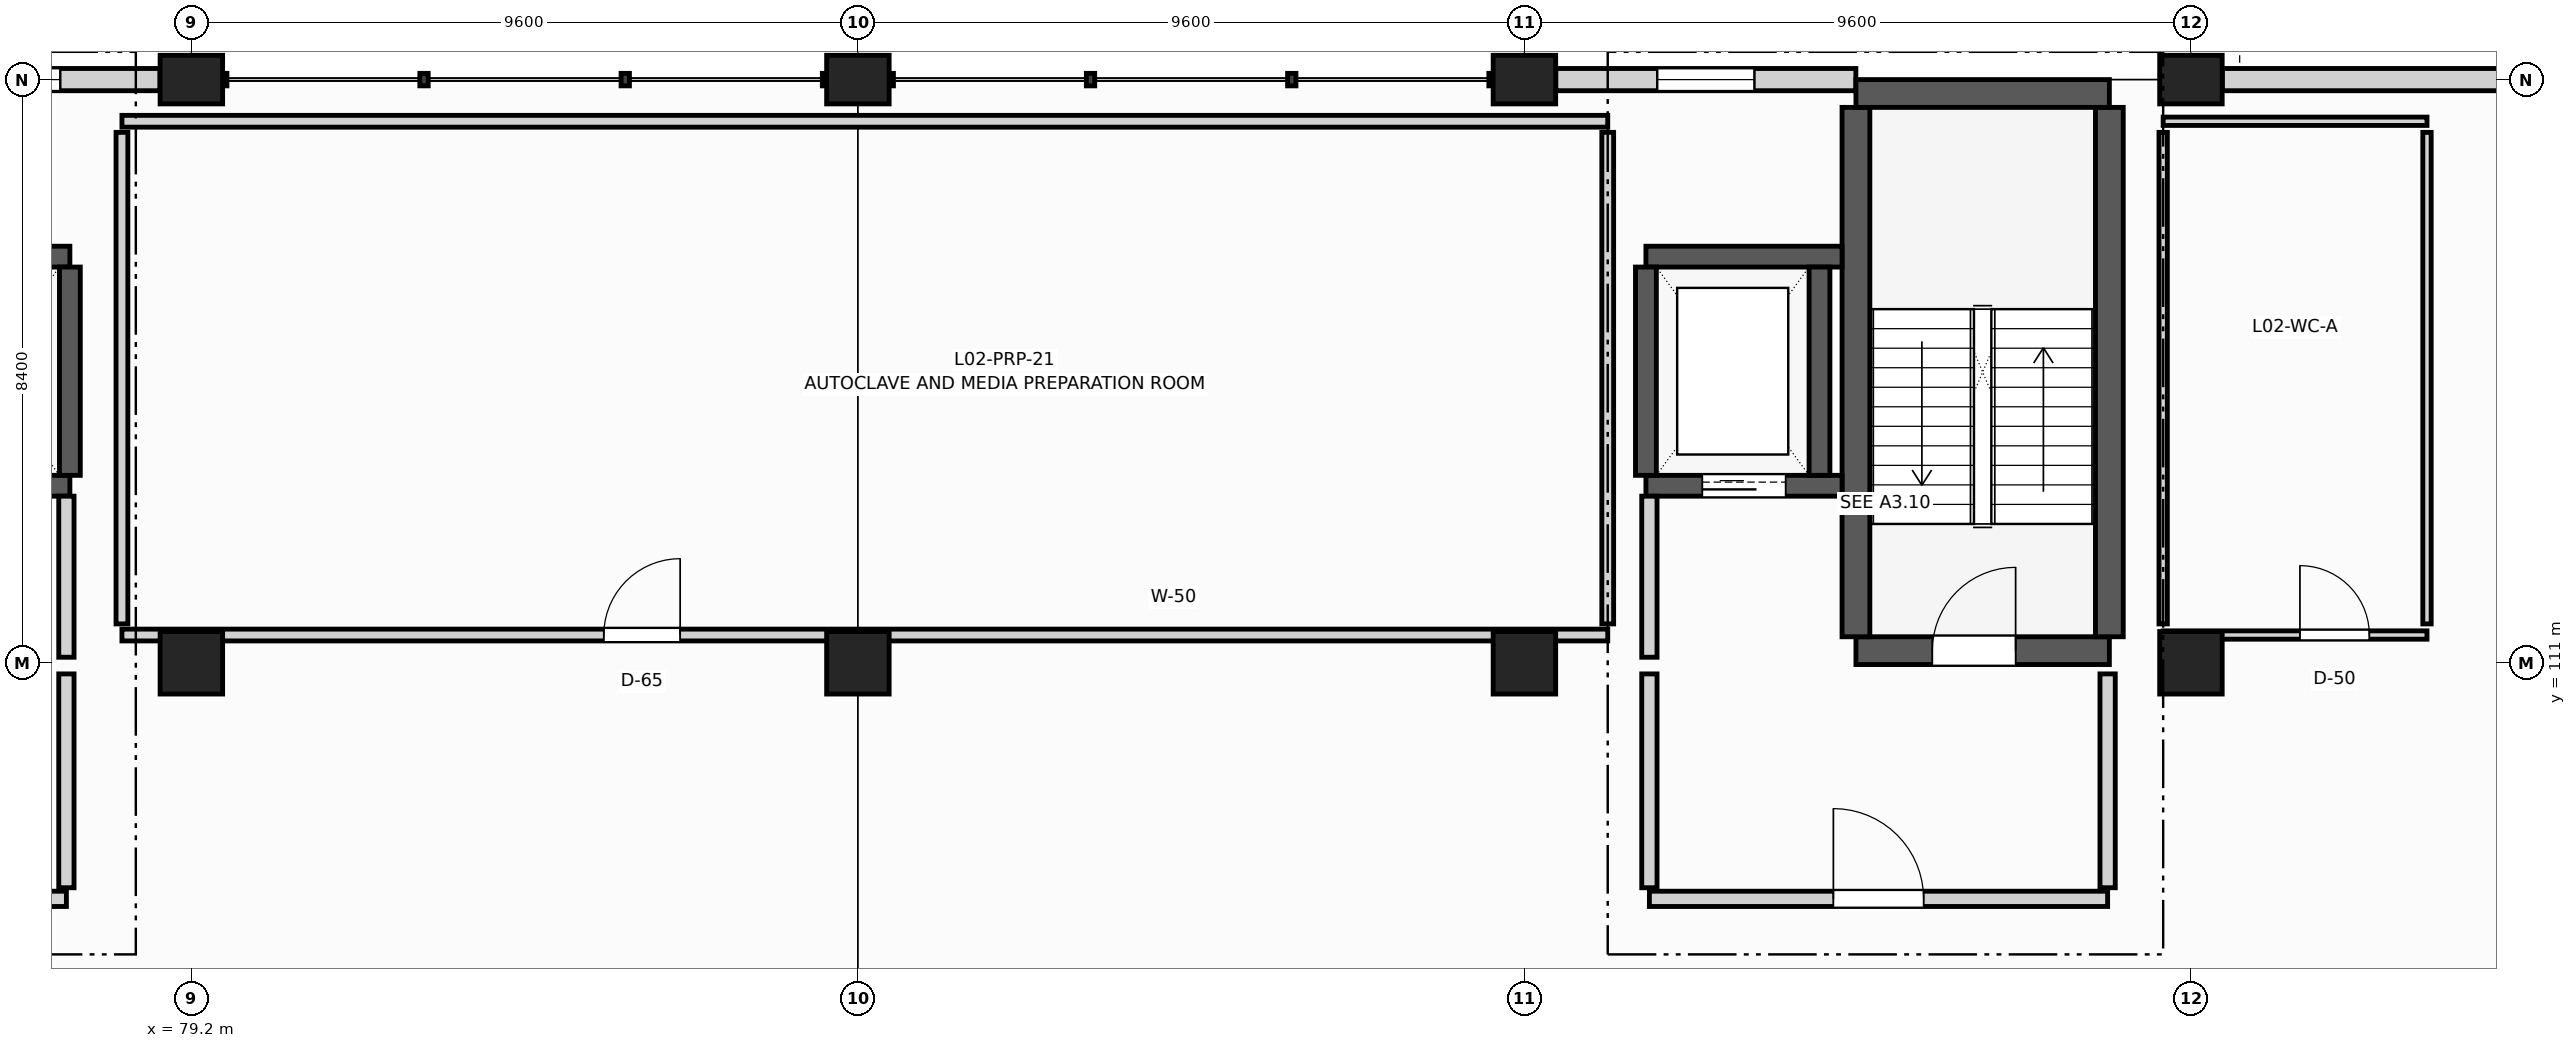
"""IFC4 building model, lengths in metres.
Left out: names, types, materials, properties, quantities, classifications, styles, units other than length and angle.
Written with IfcOpenShell. Run it as: python <this file> out.ifc"""

import sys

from ifc_helpers import new_model, si_unit, direction, frame, frame_2d, origin, origin_2d, place, context, subcontext, project, spatial, rectangle, extrude, element, fill, save


model = new_model("IFC4")
c1 = context("Model", 3, precision=1e-05, world=origin(), true_north=direction((0.0, 1.0)))
c2 = subcontext(c1, "Body", "Model", "MODEL_VIEW")
j1 = project(units=[si_unit("LENGTHUNIT", "METRE"), si_unit("PLANEANGLEUNIT", "RADIAN")], contexts=[c1])
p1 = place(None, origin())
s1 = spatial("IfcSite", under=j1, at=p1, CompositionType="ELEMENT")
p2 = place(p1, origin())
s2 = spatial("IfcBuilding", under=s1, at=p2, CompositionType="ELEMENT")
p3 = place(p2, frame((0.0, 0.0, 9.9)))
s3 = spatial("IfcBuildingStorey", under=s2, at=p3, CompositionType="ELEMENT", Elevation=9.9)
p4 = place(p3, frame((79.2, 111.0, 0.0), z_axis=(0.0, 0.0, 1.0), x_axis=(1.0, 0.0, 0.0)))
e1 = element("IfcColumn", 1, at=p4, inside=s3, PredefinedType="COLUMN", context=c2, shape_type="SweptSolid", body=[
    extrude(rectangle(XDim=0.9, YDim=0.9, at=origin_2d()), origin(), (0.0, 0.0, 1.0), 3.9),
])
p5 = place(p3, frame((79.2, 119.4, 0.0), z_axis=(0.0, 0.0, 1.0), x_axis=(1.0, 0.0, 0.0)))
e2 = element("IfcColumn", 2, at=p5, inside=s3, PredefinedType="COLUMN", context=c2, shape_type="SweptSolid", body=[
    extrude(rectangle(XDim=0.9, YDim=0.7, at=origin_2d()), origin(), (0.0, 0.0, 1.0), 3.9),
])
p6 = place(p3, frame((88.8, 111.0, 0.0), z_axis=(0.0, 0.0, 1.0), x_axis=(1.0, 0.0, 0.0)))
e3 = element("IfcColumn", 3, at=p6, inside=s3, PredefinedType="COLUMN", context=c2, shape_type="SweptSolid", body=[
    extrude(rectangle(XDim=0.9, YDim=0.9, at=origin_2d()), origin(), (0.0, 0.0, 1.0), 3.9),
])
p7 = place(p3, frame((88.8, 119.4, 0.0), z_axis=(0.0, 0.0, 1.0), x_axis=(1.0, 0.0, 0.0)))
e4 = element("IfcColumn", 4, at=p7, inside=s3, PredefinedType="COLUMN", context=c2, shape_type="SweptSolid", body=[
    extrude(rectangle(XDim=0.9, YDim=0.7, at=origin_2d()), origin(), (0.0, 0.0, 1.0), 3.9),
])
p8 = place(p3, frame((98.4, 111.0, 0.0), z_axis=(0.0, 0.0, 1.0), x_axis=(1.0, 0.0, 0.0)))
e5 = element("IfcColumn", 5, at=p8, inside=s3, PredefinedType="COLUMN", context=c2, shape_type="SweptSolid", body=[
    extrude(rectangle(XDim=0.9, YDim=0.9, at=origin_2d()), origin(), (0.0, 0.0, 1.0), 3.9),
])
p9 = place(p3, frame((98.4, 119.4, 0.0), z_axis=(0.0, 0.0, 1.0), x_axis=(1.0, 0.0, 0.0)))
e6 = element("IfcColumn", 6, at=p9, inside=s3, PredefinedType="COLUMN", context=c2, shape_type="SweptSolid", body=[
    extrude(rectangle(XDim=0.9, YDim=0.7, at=origin_2d()), origin(), (0.0, 0.0, 1.0), 3.9),
])
p10 = place(p3, frame((108.0, 111.0, 0.0), z_axis=(0.0, 0.0, 1.0), x_axis=(1.0, 0.0, 0.0)))
e7 = element("IfcColumn", 7, at=p10, inside=s3, PredefinedType="COLUMN", context=c2, shape_type="SweptSolid", body=[
    extrude(rectangle(XDim=0.9, YDim=0.9, at=origin_2d()), origin(), (0.0, 0.0, 1.0), 3.9),
])
p11 = place(p3, frame((108.0, 119.4, 0.0), z_axis=(0.0, 0.0, 1.0), x_axis=(1.0, 0.0, 0.0)))
e8 = element("IfcColumn", 8, at=p11, inside=s3, PredefinedType="COLUMN", context=c2, shape_type="SweptSolid", body=[
    extrude(rectangle(XDim=0.9, YDim=0.7, at=origin_2d()), origin(), (0.0, 0.0, 1.0), 3.9),
])
p12 = place(p3, frame((74.476, 119.4, 0.0), z_axis=(0.0, 0.0, 1.0), x_axis=(1.0, 0.0, 0.0)))
e9 = element("IfcWall", 9, at=p12, inside=s3, PredefinedType="SOLIDWALL", context=c2, shape_type="SweptSolid", body=[
    extrude(rectangle(XDim=4.272, YDim=0.32, at=frame_2d((2.136, 0.0))), origin(), (0.0, 0.0, 1.0), 3.08),
])
p13 = place(p12, frame((1.436, 0.0, 0.9)))
e10 = element("IfcOpeningElement", 10, at=p13, cuts=e9, PredefinedType="OPENING", context=c2, shape_type="SweptSolid", body=[
    extrude(rectangle(XDim=1.4, YDim=1.65, at=frame_2d((0.7, 0.825))), frame((0.0, 0.17, 0.0), z_axis=(0.0, -1.0, 0.0), x_axis=(1.0, 0.0, 0.0)), (0.0, 0.0, 1.0), 0.34),
])
p14 = place(p3, frame((98.852, 119.4, 0.0), z_axis=(0.0, 0.0, 1.0), x_axis=(1.0, 0.0, 0.0)))
e11 = element("IfcWall", 11, at=p14, inside=s3, PredefinedType="SOLIDWALL", context=c2, shape_type="SweptSolid", body=[
    extrude(rectangle(XDim=4.322, YDim=0.32, at=frame_2d((2.161, 0.0))), origin(), (0.0, 0.0, 1.0), 3.08),
])
p15 = place(p14, frame((1.461, 0.0, 0.9)))
e12 = element("IfcOpeningElement", 12, at=p15, cuts=e11, PredefinedType="OPENING", context=c2, shape_type="SweptSolid", body=[
    extrude(rectangle(XDim=1.4, YDim=1.65, at=frame_2d((0.7, 0.825))), frame((0.0, 0.17, 0.0), z_axis=(0.0, -1.0, 0.0), x_axis=(1.0, 0.0, 0.0)), (0.0, 0.0, 1.0), 0.34),
])
p16 = place(p3, frame((108.452, 119.4, 0.0), z_axis=(0.0, 0.0, 1.0), x_axis=(1.0, 0.0, 0.0)))
e13 = element("IfcWall", 13, at=p16, inside=s3, PredefinedType="SOLIDWALL", context=c2, shape_type="SweptSolid", body=[
    extrude(rectangle(XDim=8.696, YDim=0.32, at=frame_2d((4.348, 0.0))), origin(), (0.0, 0.0, 1.0), 3.08),
])
p17 = place(p16, frame((5.298, 0.0, 0.85)))
e14 = element("IfcOpeningElement", 14, at=p17, cuts=e13, PredefinedType="OPENING", context=c2, shape_type="SweptSolid", body=[
    extrude(rectangle(XDim=2.1, YDim=1.95, at=frame_2d((1.05, 0.975))), frame((0.0, 0.17, 0.0), z_axis=(0.0, -1.0, 0.0), x_axis=(1.0, 0.0, 0.0)), (0.0, 0.0, 1.0), 0.34),
])
p18 = place(p3, frame((103.175, 111.175, 0.0), z_axis=(0.0, 0.0, 1.0), x_axis=(1.0, 0.0, 0.0)))
e15 = element("IfcWall", 15, at=p18, inside=s3, PredefinedType="SHEAR", context=c2, shape_type="SweptSolid", body=[
    extrude(rectangle(XDim=3.65, YDim=0.4, at=frame_2d((1.825, 0.0))), origin(), (0.0, 0.0, 1.0), 3.9),
])
p19 = place(p18, frame((1.1, 0.0, 0.0)))
e16 = element("IfcOpeningElement", 16, at=p19, cuts=e15, PredefinedType="OPENING", context=c2, shape_type="SweptSolid", body=[
    extrude(rectangle(XDim=1.2, YDim=2.2, at=frame_2d((0.6, 1.1))), frame((0.0, 0.21, 0.0), z_axis=(0.0, -1.0, 0.0), x_axis=(1.0, 0.0, 0.0)), (0.0, 0.0, 1.0), 0.42),
])
for number, where, z_axis, x_axis in (
    (17, (103.175, 111.375, 0.0), (0.0, 0.0, 1.0), (0.0, 1.0, 0.0)),
    (18, (106.825, 111.375, 0.0), (0.0, 0.0, 1.0), (0.0, 1.0, 0.0)),
):
    element("IfcWall", number, at=place(p3, frame(where, z_axis=z_axis, x_axis=x_axis)), inside=s3, PredefinedType="SHEAR", context=c2, shape_type="SweptSolid", body=[
        extrude(rectangle(XDim=7.625, YDim=0.4, at=frame_2d((3.812, 0.0))), origin(), (0.0, 0.0, 1.0), 3.9),
    ])
p20 = place(p3, frame((103.175, 119.2, 0.0), z_axis=(0.0, 0.0, 1.0), x_axis=(1.0, 0.0, 0.0)))
e19 = element("IfcWall", 19, at=p20, inside=s3, PredefinedType="SHEAR", context=c2, shape_type="SweptSolid", body=[
    extrude(rectangle(XDim=3.65, YDim=0.4, at=frame_2d((1.825, 0.0))), origin(), (0.0, 0.0, 1.0), 3.9),
])
p21 = place(p3, frame((74.7, 113.55, 0.0), z_axis=(0.0, 0.0, 1.0), x_axis=(1.0, 0.0, 0.0)))
e20 = element("IfcWall", 20, at=p21, inside=s3, PredefinedType="SHEAR", context=c2, shape_type="SweptSolid", body=[
    extrude(rectangle(XDim=2.75, YDim=0.3, at=frame_2d((1.375, 0.0))), origin(), (0.0, 0.0, 1.0), 3.9),
])
p22 = place(p21, frame((0.775, 0.0, 0.0)))
e21 = element("IfcOpeningElement", 21, at=p22, cuts=e20, PredefinedType="OPENING", context=c2, shape_type="SweptSolid", body=[
    extrude(rectangle(XDim=1.2, YDim=2.2, at=frame_2d((0.6, 1.1))), frame((0.0, 0.16, 0.0), z_axis=(0.0, -1.0, 0.0), x_axis=(1.0, 0.0, 0.0)), (0.0, 0.0, 1.0), 0.32),
])
p23 = place(p3, frame((74.7, 116.85, 0.0), z_axis=(0.0, 0.0, 1.0), x_axis=(1.0, 0.0, 0.0)))
e22 = element("IfcWall", 22, at=p23, inside=s3, PredefinedType="SHEAR", context=c2, shape_type="SweptSolid", body=[
    extrude(rectangle(XDim=2.75, YDim=0.3, at=frame_2d((1.375, 0.0))), origin(), (0.0, 0.0, 1.0), 3.9),
])
p24 = place(p3, frame((77.45, 113.7, 0.0), z_axis=(0.0, 0.0, 1.0), x_axis=(0.0, 1.0, 0.0)))
e23 = element("IfcWall", 23, at=p24, inside=s3, PredefinedType="SHEAR", context=c2, shape_type="SweptSolid", body=[
    extrude(rectangle(XDim=3.0, YDim=0.3, at=frame_2d((1.5, 0.0))), origin(), (0.0, 0.0, 1.0), 3.9),
])
p25 = place(p3, frame((100.15, 113.55, 0.0), z_axis=(0.0, 0.0, 1.0), x_axis=(1.0, 0.0, 0.0)))
e24 = element("IfcWall", 24, at=p25, inside=s3, PredefinedType="SHEAR", context=c2, shape_type="SweptSolid", body=[
    extrude(rectangle(XDim=2.825, YDim=0.3, at=frame_2d((1.413, 0.0))), origin(), (0.0, 0.0, 1.0), 3.9),
])
p26 = place(p25, frame((0.812, 0.0, 0.0)))
e25 = element("IfcOpeningElement", 25, at=p26, cuts=e24, PredefinedType="OPENING", context=c2, shape_type="SweptSolid", body=[
    extrude(rectangle(XDim=1.2, YDim=2.2, at=frame_2d((0.6, 1.1))), frame((0.0, 0.16, 0.0), z_axis=(0.0, -1.0, 0.0), x_axis=(1.0, 0.0, 0.0)), (0.0, 0.0, 1.0), 0.32),
])
p27 = place(p3, frame((100.15, 116.85, 0.0), z_axis=(0.0, 0.0, 1.0), x_axis=(1.0, 0.0, 0.0)))
e26 = element("IfcWall", 26, at=p27, inside=s3, PredefinedType="SHEAR", context=c2, shape_type="SweptSolid", body=[
    extrude(rectangle(XDim=2.825, YDim=0.3, at=frame_2d((1.413, 0.0))), origin(), (0.0, 0.0, 1.0), 3.9),
])
for number, where, z_axis, x_axis in (
    (27, (100.15, 113.7, 0.0), (0.0, 0.0, 1.0), (0.0, 1.0, 0.0)),
    (28, (102.65, 113.7, 0.0), (0.0, 0.0, 1.0), (0.0, 1.0, 0.0)),
):
    element("IfcWall", number, at=place(p3, frame(where, z_axis=z_axis, x_axis=x_axis)), inside=s3, PredefinedType="SHEAR", context=c2, shape_type="SweptSolid", body=[
        extrude(rectangle(XDim=3.0, YDim=0.3, at=frame_2d((1.5, 0.0))), origin(), (0.0, 0.0, 1.0), 3.9),
    ])
p28 = place(p3, frame((70.8, 107.6, 0.0), z_axis=(0.0, 0.0, 1.0), x_axis=(1.0, 0.0, 0.0)))
e29 = element("IfcWall", 29, at=p28, inside=s3, PredefinedType="PARTITIONING", context=c2, shape_type="SweptSolid", body=[
    extrude(rectangle(XDim=6.6, YDim=0.22, at=frame_2d((3.3, 0.0))), origin(), (0.0, 0.0, 1.0), 2.92),
])
p29 = place(p28, frame((2.65, 0.0, 0.0)))
e30 = element("IfcOpeningElement", 30, at=p29, cuts=e29, PredefinedType="OPENING", context=c2, shape_type="SweptSolid", body=[
    extrude(rectangle(XDim=1.3, YDim=2.2, at=frame_2d((0.65, 1.1))), frame((0.0, 0.12, 0.0), z_axis=(0.0, -1.0, 0.0), x_axis=(1.0, 0.0, 0.0)), (0.0, 0.0, 1.0), 0.24),
])
p30 = place(p3, frame((77.4, 111.08, 0.0), z_axis=(0.0, 0.0, 1.0), x_axis=(0.0, 1.0, 0.0)))
e31 = element("IfcWall", 31, at=p30, inside=s3, PredefinedType="PARTITIONING", context=c2, shape_type="SweptSolid", body=[
    extrude(rectangle(XDim=2.32, YDim=0.22, at=frame_2d((1.16, 0.0))), origin(), (0.0, 0.0, 1.0), 2.92),
])
p31 = place(p3, frame((77.4, 107.76, 0.0), z_axis=(0.0, 0.0, 1.0), x_axis=(0.0, 1.0, 0.0)))
e32 = element("IfcWall", 32, at=p31, inside=s3, PredefinedType="PARTITIONING", context=c2, shape_type="SweptSolid", body=[
    extrude(rectangle(XDim=3.08, YDim=0.22, at=frame_2d((1.54, 0.0))), origin(), (0.0, 0.0, 1.0), 2.92),
])
p32 = place(p3, frame((100.2, 107.6, 0.0), z_axis=(0.0, 0.0, 1.0), x_axis=(1.0, 0.0, 0.0)))
e33 = element("IfcWall", 33, at=p32, inside=s3, PredefinedType="PARTITIONING", context=c2, shape_type="SweptSolid", body=[
    extrude(rectangle(XDim=6.6, YDim=0.22, at=frame_2d((3.3, 0.0))), origin(), (0.0, 0.0, 1.0), 2.92),
])
p33 = place(p32, frame((2.65, 0.0, 0.0)))
e34 = element("IfcOpeningElement", 34, at=p33, cuts=e33, PredefinedType="OPENING", context=c2, shape_type="SweptSolid", body=[
    extrude(rectangle(XDim=1.3, YDim=2.2, at=frame_2d((0.65, 1.1))), frame((0.0, 0.12, 0.0), z_axis=(0.0, -1.0, 0.0), x_axis=(1.0, 0.0, 0.0)), (0.0, 0.0, 1.0), 0.24),
])
p34 = place(p3, frame((100.2, 111.08, 0.0), z_axis=(0.0, 0.0, 1.0), x_axis=(0.0, 1.0, 0.0)))
e35 = element("IfcWall", 35, at=p34, inside=s3, PredefinedType="PARTITIONING", context=c2, shape_type="SweptSolid", body=[
    extrude(rectangle(XDim=2.32, YDim=0.22, at=frame_2d((1.16, 0.0))), origin(), (0.0, 0.0, 1.0), 2.92),
])
for number, where, z_axis, x_axis in (
    (36, (100.2, 107.76, 0.0), (0.0, 0.0, 1.0), (0.0, 1.0, 0.0)),
    (37, (106.8, 107.76, 0.0), (0.0, 0.0, 1.0), (0.0, 1.0, 0.0)),
):
    element("IfcWall", number, at=place(p3, frame(where, z_axis=z_axis, x_axis=x_axis)), inside=s3, PredefinedType="PARTITIONING", context=c2, shape_type="SweptSolid", body=[
        extrude(rectangle(XDim=3.08, YDim=0.22, at=frame_2d((1.54, 0.0))), origin(), (0.0, 0.0, 1.0), 2.92),
    ])
p35 = place(p3, frame((78.2, 111.4, 0.0), z_axis=(0.0, 0.0, 1.0), x_axis=(1.0, 0.0, 0.0)))
e38 = element("IfcWall", 38, at=p35, inside=s3, PredefinedType="PARTITIONING", context=c2, shape_type="SweptSolid", body=[
    extrude(rectangle(XDim=21.4, YDim=0.17, at=frame_2d((10.7, 0.0))), origin(), (0.0, 0.0, 1.0), 2.92),
])
p36 = place(p35, frame((6.94, 0.0, 0.0)))
e39 = element("IfcOpeningElement", 39, at=p36, cuts=e38, PredefinedType="OPENING", context=c2, shape_type="SweptSolid", body=[
    extrude(rectangle(XDim=1.1, YDim=2.2, at=frame_2d((0.55, 1.1))), frame((0.0, 0.095, 0.0), z_axis=(0.0, -1.0, 0.0), x_axis=(1.0, 0.0, 0.0)), (0.0, 0.0, 1.0), 0.19),
])
p37 = place(p3, frame((78.2, 118.8, 0.0), z_axis=(0.0, 0.0, 1.0), x_axis=(1.0, 0.0, 0.0)))
e40 = element("IfcWall", 40, at=p37, inside=s3, PredefinedType="PARTITIONING", context=c2, shape_type="SweptSolid", body=[
    extrude(rectangle(XDim=21.4, YDim=0.17, at=frame_2d((10.7, 0.0))), origin(), (0.0, 0.0, 1.0), 2.92),
])
for number, where, z_axis, x_axis in (
    (41, (78.2, 111.56, 0.0), (0.0, 0.0, 1.0), (0.0, 1.0, 0.0)),
    (42, (99.6, 111.56, 0.0), (0.0, 0.0, 1.0), (0.0, 1.0, 0.0)),
):
    element("IfcWall", number, at=place(p3, frame(where, z_axis=z_axis, x_axis=x_axis)), inside=s3, PredefinedType="PARTITIONING", context=c2, shape_type="SweptSolid", body=[
        extrude(rectangle(XDim=7.08, YDim=0.17, at=frame_2d((3.54, 0.0))), origin(), (0.0, 0.0, 1.0), 2.92),
    ])
p38 = place(p3, frame((107.6, 111.4, 0.0), z_axis=(0.0, 0.0, 1.0), x_axis=(1.0, 0.0, 0.0)))
e43 = element("IfcWall", 43, at=p38, inside=s3, PredefinedType="PARTITIONING", context=c2, shape_type="SweptSolid", body=[
    extrude(rectangle(XDim=3.8, YDim=0.12, at=frame_2d((1.9, 0.0))), origin(), (0.0, 0.0, 1.0), 2.92),
])
p39 = place(p38, frame((1.97, 0.0, 0.0)))
e44 = element("IfcOpeningElement", 44, at=p39, cuts=e43, PredefinedType="OPENING", context=c2, shape_type="SweptSolid", body=[
    extrude(rectangle(XDim=1.0, YDim=2.15, at=frame_2d((0.5, 1.075))), frame((0.0, 0.07, 0.0), z_axis=(0.0, -1.0, 0.0), x_axis=(1.0, 0.0, 0.0)), (0.0, 0.0, 1.0), 0.14),
])
p40 = place(p3, frame((107.6, 118.8, 0.0), z_axis=(0.0, 0.0, 1.0), x_axis=(1.0, 0.0, 0.0)))
e45 = element("IfcWall", 45, at=p40, inside=s3, PredefinedType="PARTITIONING", context=c2, shape_type="SweptSolid", body=[
    extrude(rectangle(XDim=3.8, YDim=0.12, at=frame_2d((1.9, 0.0))), origin(), (0.0, 0.0, 1.0), 2.92),
])
for number, where, z_axis, x_axis in (
    (46, (107.6, 111.56, 0.0), (0.0, 0.0, 1.0), (0.0, 1.0, 0.0)),
    (47, (111.4, 111.56, 0.0), (0.0, 0.0, 1.0), (0.0, 1.0, 0.0)),
):
    element("IfcWall", number, at=place(p3, frame(where, z_axis=z_axis, x_axis=x_axis)), inside=s3, PredefinedType="PARTITIONING", context=c2, shape_type="SweptSolid", body=[
        extrude(rectangle(XDim=7.08, YDim=0.12, at=frame_2d((3.54, 0.0))), origin(), (0.0, 0.0, 1.0), 2.92),
    ])
p41 = place(p13, origin())
e48 = element("IfcWindow", 48, at=p41, inside=s3, PartitioningType="SINGLE_PANEL", PredefinedType="WINDOW", context=c2, shape_type="SweptSolid", body=[
    extrude(rectangle(XDim=1.4, YDim=1.65, at=frame_2d((0.7, 0.825))), frame((0.0, 0.03, 0.0), z_axis=(0.0, -1.0, 0.0), x_axis=(1.0, 0.0, 0.0)), (0.0, 0.0, 1.0), 0.06),
])
fill(e10, e48)
p42 = place(p15, origin())
e49 = element("IfcWindow", 49, at=p42, inside=s3, PartitioningType="SINGLE_PANEL", PredefinedType="WINDOW", context=c2, shape_type="SweptSolid", body=[
    extrude(rectangle(XDim=1.4, YDim=1.65, at=frame_2d((0.7, 0.825))), frame((0.0, 0.03, 0.0), z_axis=(0.0, -1.0, 0.0), x_axis=(1.0, 0.0, 0.0)), (0.0, 0.0, 1.0), 0.06),
])
fill(e12, e49)
p43 = place(p19, origin())
e50 = element("IfcDoor", 50, at=p43, inside=s3, OperationType="SINGLE_SWING_RIGHT", PredefinedType="DOOR", context=c2, shape_type="SweptSolid", body=[
    extrude(rectangle(XDim=1.2, YDim=2.2, at=frame_2d((0.6, 1.1))), frame((0.0, 0.025, 0.0), z_axis=(0.0, -1.0, 0.0), x_axis=(1.0, 0.0, 0.0)), (0.0, 0.0, 1.0), 0.05),
])
fill(e16, e50)
p44 = place(p26, origin())
e51 = element("IfcDoor", 51, at=p44, inside=s3, OperationType="SLIDING_TO_LEFT", PredefinedType="DOOR", context=c2, shape_type="SweptSolid", body=[
    extrude(rectangle(XDim=1.2, YDim=2.2, at=frame_2d((0.6, 1.1))), frame((0.0, 0.025, 0.0), z_axis=(0.0, -1.0, 0.0), x_axis=(1.0, 0.0, 0.0)), (0.0, 0.0, 1.0), 0.05),
])
fill(e25, e51)
p45 = place(p33, origin())
e52 = element("IfcDoor", 52, at=p45, inside=s3, OperationType="SINGLE_SWING_LEFT", PredefinedType="DOOR", context=c2, shape_type="SweptSolid", body=[
    extrude(rectangle(XDim=1.3, YDim=2.2, at=frame_2d((0.65, 1.1))), frame((0.0, 0.025, 0.0), z_axis=(0.0, -1.0, 0.0), x_axis=(1.0, 0.0, 0.0)), (0.0, 0.0, 1.0), 0.05),
])
fill(e34, e52)
p46 = place(p36, origin())
e53 = element("IfcDoor", 53, at=p46, inside=s3, OperationType="SINGLE_SWING_RIGHT", PredefinedType="DOOR", context=c2, shape_type="SweptSolid", body=[
    extrude(rectangle(XDim=1.1, YDim=2.2, at=frame_2d((0.55, 1.1))), frame((0.0, 0.025, 0.0), z_axis=(0.0, -1.0, 0.0), x_axis=(1.0, 0.0, 0.0)), (0.0, 0.0, 1.0), 0.05),
])
fill(e39, e53)
p47 = place(p39, origin())
e54 = element("IfcDoor", 54, at=p47, inside=s3, OperationType="SINGLE_SWING_LEFT", PredefinedType="DOOR", context=c2, shape_type="SweptSolid", body=[
    extrude(rectangle(XDim=1.0, YDim=2.15, at=frame_2d((0.5, 1.075))), frame((0.0, 0.025, 0.0), z_axis=(0.0, -1.0, 0.0), x_axis=(1.0, 0.0, 0.0)), (0.0, 0.0, 1.0), 0.05),
])
fill(e44, e54)
save(model, sys.argv[1])
